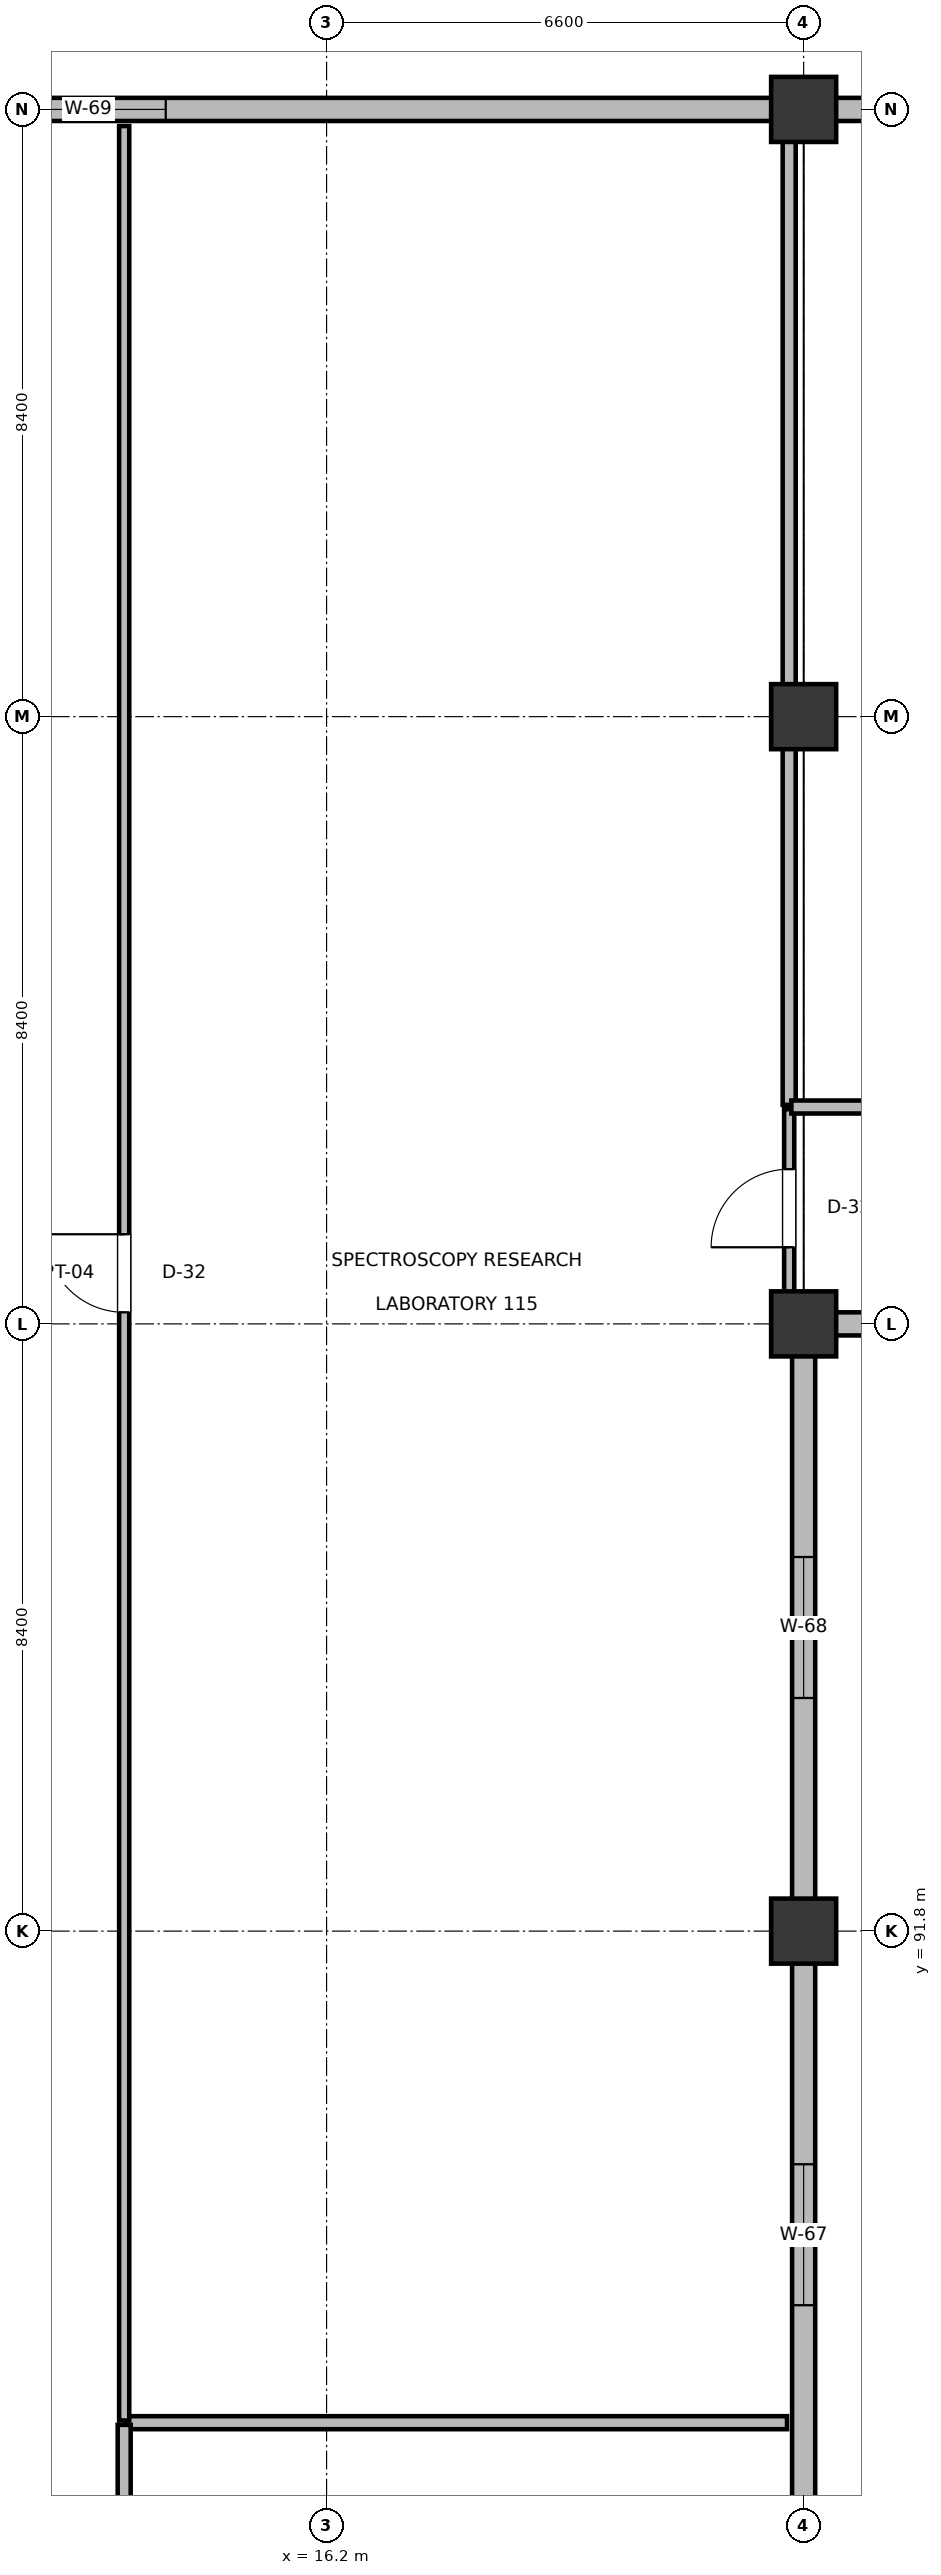
"""IFC4 building model, lengths in metres.
Left out: names, types, materials, properties, quantities, classifications, styles, units other than length and angle.
Written with IfcOpenShell. Run it as: python <this file> out.ifc"""

import sys

from ifc_helpers import new_model, si_unit, direction, frame, frame_2d, origin, origin_2d, place, context, subcontext, project, spatial, rectangle, extrude, element, fill, save


model = new_model("IFC4")
c1 = context("Model", 3, precision=1e-05, world=origin(), true_north=direction((0.0, 1.0)))
c2 = subcontext(c1, "Body", "Model", "MODEL_VIEW")
j1 = project(units=[si_unit("LENGTHUNIT", "METRE"), si_unit("PLANEANGLEUNIT", "RADIAN")], contexts=[c1])
p1 = place(None, origin())
s1 = spatial("IfcSite", under=j1, at=p1, CompositionType="ELEMENT")
p2 = place(p1, origin())
s2 = spatial("IfcBuilding", under=s1, at=p2, CompositionType="ELEMENT")
p3 = place(p2, frame((0.0, 0.0, 5.4)))
s3 = spatial("IfcBuildingStorey", under=s2, at=p3, CompositionType="ELEMENT", Elevation=5.4)
for number, where, z_axis, x_axis in (
    (1, (22.8, 91.8, 0.0), (0.0, 0.0, 1.0), (1.0, 0.0, 0.0)),
    (2, (22.8, 100.2, 0.0), (0.0, 0.0, 1.0), (1.0, 0.0, 0.0)),
    (3, (22.8, 108.6, 0.0), (0.0, 0.0, 1.0), (1.0, 0.0, 0.0)),
    (4, (22.8, 117.0, 0.0), (0.0, 0.0, 1.0), (1.0, 0.0, 0.0)),
):
    element("IfcColumn", number, at=place(p3, frame(where, z_axis=z_axis, x_axis=x_axis)), inside=s3, PredefinedType="COLUMN", context=c2, shape_type="SweptSolid", body=[
        extrude(rectangle(XDim=0.9, YDim=0.9, at=origin_2d()), origin(), (0.0, 0.0, 1.0), 4.8),
    ])
p4 = place(p3, frame((22.8, 83.835, 0.0), z_axis=(0.0, 0.0, 1.0), x_axis=(0.0, 1.0, 0.0)))
e5 = element("IfcWall", 5, at=p4, inside=s3, PredefinedType="SOLIDWALL", context=c2, shape_type="SweptSolid", body=[
    extrude(rectangle(XDim=7.53, YDim=0.32, at=frame_2d((3.765, 0.0))), origin(), (0.0, 0.0, 1.0), 3.825),
])
p5 = place(p4, frame((2.79, 0.0, 0.9)))
e6 = element("IfcOpeningElement", 6, at=p5, cuts=e5, PredefinedType="OPENING", context=c2, shape_type="SweptSolid", body=[
    extrude(rectangle(XDim=1.95, YDim=1.55, at=frame_2d((0.975, 0.775))), frame((0.0, 0.17, 0.0), z_axis=(0.0, -1.0, 0.0), x_axis=(1.0, 0.0, 0.0)), (0.0, 0.0, 1.0), 0.34),
])
p6 = place(p3, frame((22.8, 92.235, 0.0), z_axis=(0.0, 0.0, 1.0), x_axis=(0.0, 1.0, 0.0)))
e7 = element("IfcWall", 7, at=p6, inside=s3, PredefinedType="SOLIDWALL", context=c2, shape_type="SweptSolid", body=[
    extrude(rectangle(XDim=7.53, YDim=0.32, at=frame_2d((3.765, 0.0))), origin(), (0.0, 0.0, 1.0), 3.825),
])
p7 = place(p6, frame((2.79, 0.0, 0.9)))
e8 = element("IfcOpeningElement", 8, at=p7, cuts=e7, PredefinedType="OPENING", context=c2, shape_type="SweptSolid", body=[
    extrude(rectangle(XDim=1.95, YDim=1.75, at=frame_2d((0.975, 0.875))), frame((0.0, 0.17, 0.0), z_axis=(0.0, -1.0, 0.0), x_axis=(1.0, 0.0, 0.0)), (0.0, 0.0, 1.0), 0.34),
])
p8 = place(p3, frame((3.435, 117.0, 0.0), z_axis=(0.0, 0.0, 1.0), x_axis=(1.0, 0.0, 0.0)))
e9 = element("IfcWall", 9, at=p8, inside=s3, PredefinedType="SOLIDWALL", context=c2, shape_type="SweptSolid", body=[
    extrude(rectangle(XDim=18.93, YDim=0.32, at=frame_2d((9.465, 0.0))), origin(), (0.0, 0.0, 1.0), 3.775),
])
p9 = place(p8, frame((8.39, 0.0, 0.95)))
e10 = element("IfcOpeningElement", 10, at=p9, cuts=e9, PredefinedType="OPENING", context=c2, shape_type="SweptSolid", body=[
    extrude(rectangle(XDim=2.15, YDim=1.15, at=frame_2d((1.075, 0.575))), frame((0.0, 0.17, 0.0), z_axis=(0.0, -1.0, 0.0), x_axis=(1.0, 0.0, 0.0)), (0.0, 0.0, 1.0), 0.34),
])
p10 = place(p3, frame((23.235, 117.0, 0.0), z_axis=(0.0, 0.0, 1.0), x_axis=(1.0, 0.0, 0.0)))
e11 = element("IfcWall", 11, at=p10, inside=s3, PredefinedType="SOLIDWALL", context=c2, shape_type="SweptSolid", body=[
    extrude(rectangle(XDim=5.83, YDim=0.32, at=frame_2d((2.915, 0.0))), origin(), (0.0, 0.0, 1.0), 3.845),
])
p11 = place(p10, frame((1.84, 0.0, 0.9)))
e12 = element("IfcOpeningElement", 12, at=p11, cuts=e11, PredefinedType="OPENING", context=c2, shape_type="SweptSolid", body=[
    extrude(rectangle(XDim=2.15, YDim=1.35, at=frame_2d((1.075, 0.675))), frame((0.0, 0.17, 0.0), z_axis=(0.0, -1.0, 0.0), x_axis=(1.0, 0.0, 0.0)), (0.0, 0.0, 1.0), 0.34),
])
p12 = place(p3, frame((23.235, 100.2, 0.0), z_axis=(0.0, 0.0, 1.0), x_axis=(1.0, 0.0, 0.0)))
e13 = element("IfcWall", 13, at=p12, inside=s3, PredefinedType="SOLIDWALL", context=c2, shape_type="SweptSolid", body=[
    extrude(rectangle(XDim=5.83, YDim=0.32, at=frame_2d((2.915, 0.0))), origin(), (0.0, 0.0, 1.0), 3.795),
])
p13 = place(p12, frame((2.465, 0.0, 0.9)))
e14 = element("IfcOpeningElement", 14, at=p13, cuts=e13, PredefinedType="OPENING", context=c2, shape_type="SweptSolid", body=[
    extrude(rectangle(XDim=0.9, YDim=1.8, at=frame_2d((0.45, 0.9))), frame((0.0, 0.17, 0.0), z_axis=(0.0, -1.0, 0.0), x_axis=(1.0, 0.0, 0.0)), (0.0, 0.0, 1.0), 0.34),
])
p14 = place(p3, frame((13.43, 85.0, 0.0), z_axis=(0.0, 0.0, 1.0), x_axis=(1.0, 0.0, 0.0)))
e15 = element("IfcWall", 15, at=p14, inside=s3, PredefinedType="PARTITIONING", context=c2, shape_type="SweptSolid", body=[
    extrude(rectangle(XDim=9.14, YDim=0.18, at=frame_2d((4.57, 0.0))), origin(), (0.0, 0.0, 1.0), 3.825),
])
p15 = place(p3, frame((13.4, 73.853, 0.0), z_axis=(0.0, 0.0, 1.0), x_axis=(0.0, 1.0, 0.0)))
e16 = element("IfcWall", 16, at=p15, inside=s3, PredefinedType="PARTITIONING", context=c2, shape_type="SweptSolid", body=[
    extrude(rectangle(XDim=11.117, YDim=0.18, at=frame_2d((5.558, 0.0))), origin(), (0.0, 0.0, 1.0), 3.675),
])
p16 = place(p15, frame((4.858, 0.0, 0.0)))
e17 = element("IfcOpeningElement", 17, at=p16, cuts=e16, PredefinedType="OPENING", context=c2, shape_type="SweptSolid", body=[
    extrude(rectangle(XDim=1.4, YDim=2.2, at=frame_2d((0.7, 1.1))), frame((0.0, 0.1, 0.0), z_axis=(0.0, -1.0, 0.0), x_axis=(1.0, 0.0, 0.0)), (0.0, 0.0, 1.0), 0.2),
])
p17 = place(p3, frame((13.4, 85.03, 0.0), z_axis=(0.0, 0.0, 1.0), x_axis=(0.0, 1.0, 0.0)))
e18 = element("IfcWall", 18, at=p17, inside=s3, PredefinedType="PARTITIONING", context=c2, shape_type="SweptSolid", body=[
    extrude(rectangle(XDim=31.74, YDim=0.14, at=frame_2d((15.87, 0.0))), origin(), (0.0, 0.0, 1.0), 3.675),
])
p18 = place(p17, frame((15.33, 0.0, 0.0)))
e19 = element("IfcOpeningElement", 19, at=p18, cuts=e18, PredefinedType="OPENING", context=c2, shape_type="SweptSolid", body=[
    extrude(rectangle(XDim=1.08, YDim=2.15, at=frame_2d((0.54, 1.075))), frame((0.0, 0.08, 0.0), z_axis=(0.0, -1.0, 0.0), x_axis=(1.0, 0.0, 0.0)), (0.0, 0.0, 1.0), 0.16),
])
p19 = place(p3, frame((22.6, 103.23, 0.0), z_axis=(0.0, 0.0, 1.0), x_axis=(0.0, 1.0, 0.0)))
e20 = element("IfcWall", 20, at=p19, inside=s3, PredefinedType="PARTITIONING", context=c2, shape_type="SweptSolid", body=[
    extrude(rectangle(XDim=13.54, YDim=0.18, at=frame_2d((6.77, 0.0))), origin(), (0.0, 0.0, 1.0), 3.825),
])
p20 = place(p3, frame((22.6, 100.43, 0.0), z_axis=(0.0, 0.0, 1.0), x_axis=(0.0, 1.0, 0.0)))
e21 = element("IfcWall", 21, at=p20, inside=s3, PredefinedType="PARTITIONING", context=c2, shape_type="SweptSolid", body=[
    extrude(rectangle(XDim=2.74, YDim=0.14, at=frame_2d((1.37, 0.0))), origin(), (0.0, 0.0, 1.0), 3.825),
])
p21 = place(p20, frame((0.83, 0.0, 0.0)))
e22 = element("IfcOpeningElement", 22, at=p21, cuts=e21, PredefinedType="OPENING", context=c2, shape_type="SweptSolid", body=[
    extrude(rectangle(XDim=1.08, YDim=2.15, at=frame_2d((0.54, 1.075))), frame((0.0, 0.08, 0.0), z_axis=(0.0, -1.0, 0.0), x_axis=(1.0, 0.0, 0.0)), (0.0, 0.0, 1.0), 0.16),
])
p22 = place(p3, frame((22.63, 103.2, 0.0), z_axis=(0.0, 0.0, 1.0), x_axis=(1.0, 0.0, 0.0)))
e23 = element("IfcWall", 23, at=p22, inside=s3, PredefinedType="PARTITIONING", context=c2, shape_type="SweptSolid", body=[
    extrude(rectangle(XDim=30.84, YDim=0.18, at=frame_2d((15.42, 0.0))), origin(), (0.0, 0.0, 1.0), 3.825),
])
p23 = place(p22, frame((14.895, 0.0, 0.0)))
e24 = element("IfcOpeningElement", 24, at=p23, cuts=e23, PredefinedType="OPENING", context=c2, shape_type="SweptSolid", body=[
    extrude(rectangle(XDim=1.05, YDim=2.2, at=frame_2d((0.525, 1.1))), frame((0.0, 0.1, 0.0), z_axis=(0.0, -1.0, 0.0), x_axis=(1.0, 0.0, 0.0)), (0.0, 0.0, 1.0), 0.2),
])
p24 = place(p5, frame((1.95, 0.0, 0.0), z_axis=(0.0, 0.0, 1.0), x_axis=(-1.0, 0.0, 0.0)))
e25 = element("IfcWindow", 25, at=p24, inside=s3, PartitioningType="DOUBLE_PANEL_VERTICAL", PredefinedType="WINDOW", context=c2, shape_type="SweptSolid", body=[
    extrude(rectangle(XDim=1.95, YDim=1.55, at=frame_2d((0.975, 0.775))), frame((0.0, 0.03, 0.0), z_axis=(0.0, -1.0, 0.0), x_axis=(1.0, 0.0, 0.0)), (0.0, 0.0, 1.0), 0.06),
])
fill(e6, e25)
p25 = place(p7, frame((1.95, 0.0, 0.0), z_axis=(0.0, 0.0, 1.0), x_axis=(-1.0, 0.0, 0.0)))
e26 = element("IfcWindow", 26, at=p25, inside=s3, PartitioningType="DOUBLE_PANEL_VERTICAL", PredefinedType="WINDOW", context=c2, shape_type="SweptSolid", body=[
    extrude(rectangle(XDim=1.95, YDim=1.75, at=frame_2d((0.975, 0.875))), frame((0.0, 0.03, 0.0), z_axis=(0.0, -1.0, 0.0), x_axis=(1.0, 0.0, 0.0)), (0.0, 0.0, 1.0), 0.06),
])
fill(e8, e26)
p26 = place(p9, origin())
e27 = element("IfcWindow", 27, at=p26, inside=s3, PartitioningType="DOUBLE_PANEL_VERTICAL", PredefinedType="WINDOW", context=c2, shape_type="SweptSolid", body=[
    extrude(rectangle(XDim=2.15, YDim=1.15, at=frame_2d((1.075, 0.575))), frame((0.0, 0.03, 0.0), z_axis=(0.0, -1.0, 0.0), x_axis=(1.0, 0.0, 0.0)), (0.0, 0.0, 1.0), 0.06),
])
fill(e10, e27)
p27 = place(p18, origin())
e28 = element("IfcDoor", 28, at=p27, inside=s3, OperationType="SINGLE_SWING_RIGHT", PredefinedType="DOOR", context=c2, shape_type="SweptSolid", body=[
    extrude(rectangle(XDim=1.08, YDim=2.15, at=frame_2d((0.54, 1.075))), frame((0.0, 0.025, 0.0), z_axis=(0.0, -1.0, 0.0), x_axis=(1.0, 0.0, 0.0)), (0.0, 0.0, 1.0), 0.05),
])
fill(e19, e28)
p28 = place(p21, origin())
e29 = element("IfcDoor", 29, at=p28, inside=s3, OperationType="SINGLE_SWING_LEFT", PredefinedType="DOOR", context=c2, shape_type="SweptSolid", body=[
    extrude(rectangle(XDim=1.08, YDim=2.15, at=frame_2d((0.54, 1.075))), frame((0.0, 0.025, 0.0), z_axis=(0.0, -1.0, 0.0), x_axis=(1.0, 0.0, 0.0)), (0.0, 0.0, 1.0), 0.05),
])
fill(e22, e29)
save(model, sys.argv[1])
